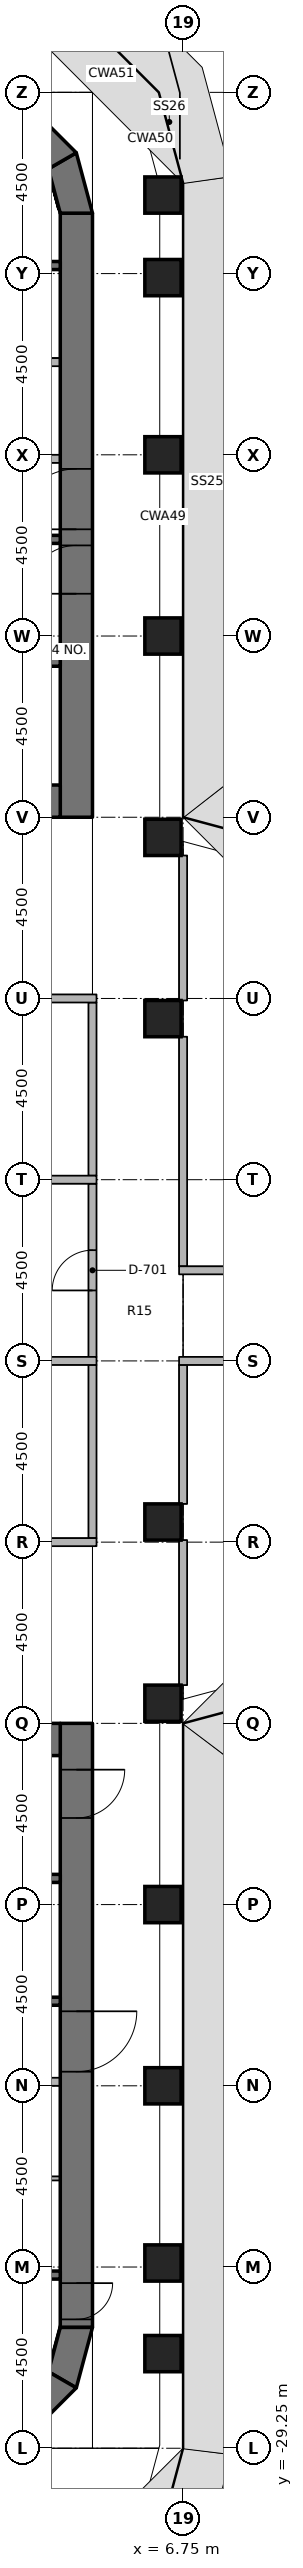
"""IFC4 building model, lengths in metres.
Left out: names, types, materials, properties, quantities, classifications, styles, units other than length and angle.
Written with IfcOpenShell. Run it as: python <this file> out.ifc"""

import sys

from ifc_helpers import new_model, si_unit, direction, frame, frame_2d, origin, origin_2d, place, context, subcontext, project, spatial, polyline, rectangle, outline, extrude, element, fill, save


model = new_model("IFC4")
c1 = context("Model", 3, precision=1e-05, world=origin(), true_north=direction((0.0, 1.0)))
c2 = subcontext(c1, "Body", "Model", "MODEL_VIEW")
j1 = project(units=[si_unit("LENGTHUNIT", "METRE"), si_unit("PLANEANGLEUNIT", "RADIAN")], contexts=[c1])
p1 = place(None, origin())
s1 = spatial("IfcSite", under=j1, at=p1, CompositionType="ELEMENT")
p2 = place(p1, origin())
s2 = spatial("IfcBuilding", under=s1, at=p2, CompositionType="ELEMENT")
p3 = place(p2, frame((0.0, 0.0, 94.2)))
s3 = spatial("IfcBuildingStorey", under=s2, at=p3, CompositionType="ELEMENT", Elevation=94.2)
for number, where, z_axis, x_axis in (
    (1, (6.25, -26.9, 0.0), (0.0, 0.0, 1.0), (1.0, 0.0, 0.0)),
    (2, (6.25, -24.65, 0.0), (0.0, 0.0, 1.0), (1.0, 0.0, 0.0)),
    (3, (6.25, -20.25, 0.0), (0.0, 0.0, 1.0), (1.0, 0.0, 0.0)),
    (4, (6.25, -15.75, 0.0), (0.0, 0.0, 1.0), (1.0, 0.0, 0.0)),
    (5, (6.25, -10.75, 0.0), (0.0, 0.0, 1.0), (1.0, 0.0, 0.0)),
    (6, (6.25, -6.25, 0.0), (0.0, 0.0, 1.0), (1.0, 0.0, 0.0)),
    (7, (6.25, 6.25, 0.0), (0.0, 0.0, 1.0), (1.0, 0.0, 0.0)),
    (8, (6.25, 10.75, 0.0), (0.0, 0.0, 1.0), (1.0, 0.0, 0.0)),
    (9, (6.25, 15.75, 0.0), (0.0, 0.0, 1.0), (1.0, 0.0, 0.0)),
    (10, (6.25, 20.25, 0.0), (0.0, 0.0, 1.0), (1.0, 0.0, 0.0)),
    (11, (6.25, 24.65, 0.0), (0.0, 0.0, 1.0), (1.0, 0.0, 0.0)),
    (12, (6.25, 26.7, 0.0), (0.0, 0.0, 1.0), (1.0, 0.0, 0.0)),
):
    element("IfcColumn", number, at=place(p3, frame(where, z_axis=z_axis, x_axis=x_axis)), inside=s3, PredefinedType="COLUMN", context=c2, shape_type="SweptSolid", body=[
        extrude(rectangle(XDim=0.9, YDim=0.9, at=origin_2d()), origin(), (0.0, 0.0, 1.0), 3.65),
    ])
p4 = place(p3, frame((4.1, 11.25, 0.0), z_axis=(0.0, 0.0, 1.0), x_axis=(0.0, 1.0, 0.0)))
e13 = element("IfcWall", 13, at=p4, inside=s3, PredefinedType="SHEAR", context=c2, shape_type="SweptSolid", body=[
    extrude(rectangle(XDim=15.0, YDim=0.8, at=frame_2d((7.5, 0.0))), origin(), (0.0, 0.0, 1.0), 3.8),
])
p5 = place(p4, frame((7.15, 0.0, 0.0)))
e14 = element("IfcOpeningElement", 14, at=p5, cuts=e13, PredefinedType="OPENING", context=c2, shape_type="SweptSolid", body=[
    extrude(rectangle(XDim=1.5, YDim=2.3, at=frame_2d((0.75, 1.15))), frame((0.0, 0.41, 0.0), z_axis=(0.0, -1.0, 0.0), x_axis=(1.0, 0.0, 0.0)), (0.0, 0.0, 1.0), 0.82),
])
p6 = place(p4, frame((5.55, 0.0, 0.0)))
e15 = element("IfcOpeningElement", 15, at=p6, cuts=e13, PredefinedType="OPENING", context=c2, shape_type="SweptSolid", body=[
    extrude(rectangle(XDim=1.2, YDim=2.1, at=frame_2d((0.6, 1.05))), frame((0.0, 0.41, 0.0), z_axis=(0.0, -1.0, 0.0), x_axis=(1.0, 0.0, 0.0)), (0.0, 0.0, 1.0), 0.82),
])
p7 = place(p3, frame((-3.7, 11.65, 0.0), z_axis=(0.0, 0.0, 1.0), x_axis=(1.0, 0.0, 0.0)))
e16 = element("IfcWall", 16, at=p7, inside=s3, PredefinedType="SHEAR", context=c2, shape_type="SweptSolid", body=[
    extrude(rectangle(XDim=7.4, YDim=0.8, at=frame_2d((3.7, 0.0))), origin(), (0.0, 0.0, 1.0), 3.8),
])
p8 = place(p3, origin())
e17 = element("IfcWall", 17, at=p8, inside=s3, PredefinedType="SHEAR", context=c2, shape_type="SweptSolid", body=[
    extrude(outline(polyline([(4.5, 26.25), (4.098, 27.75), (3.405, 27.35), (3.7, 26.25), (4.5, 26.25)])), origin(), (0.0, 0.0, 1.0), 3.8),
])
p9 = place(p3, origin())
e18 = element("IfcWall", 18, at=p9, inside=s3, PredefinedType="SHEAR", context=c2, shape_type="SweptSolid", body=[
    extrude(outline(polyline([(4.098, 27.75), (3.0, 28.848), (2.6, 28.155), (3.405, 27.35), (4.098, 27.75)])), origin(), (0.0, 0.0, 1.0), 3.8),
])
p10 = place(p3, frame((4.1, -11.25, 0.0), z_axis=(0.0, 0.0, 1.0), x_axis=(0.0, -1.0, 0.0)))
e19 = element("IfcWall", 19, at=p10, inside=s3, PredefinedType="SHEAR", context=c2, shape_type="SweptSolid", body=[
    extrude(rectangle(XDim=15.0, YDim=0.8, at=frame_2d((7.5, 0.0))), origin(), (0.0, 0.0, 1.0), 3.8),
])
p11 = place(p10, frame((7.15, 0.0, 0.0)))
e20 = element("IfcOpeningElement", 20, at=p11, cuts=e19, PredefinedType="OPENING", context=c2, shape_type="SweptSolid", body=[
    extrude(rectangle(XDim=1.5, YDim=2.3, at=frame_2d((0.75, 1.15))), frame((0.0, 0.41, 0.0), z_axis=(0.0, -1.0, 0.0), x_axis=(1.0, 0.0, 0.0)), (0.0, 0.0, 1.0), 0.82),
])
p12 = place(p10, frame((13.9, 0.0, 0.0)))
e21 = element("IfcOpeningElement", 21, at=p12, cuts=e19, PredefinedType="OPENING", context=c2, shape_type="SweptSolid", body=[
    extrude(rectangle(XDim=0.9, YDim=2.1, at=frame_2d((0.45, 1.05))), frame((0.0, 0.41, 0.0), z_axis=(0.0, -1.0, 0.0), x_axis=(1.0, 0.0, 0.0)), (0.0, 0.0, 1.0), 0.82),
])
p13 = place(p10, frame((1.15, 0.0, 0.0)))
e22 = element("IfcOpeningElement", 22, at=p13, cuts=e19, PredefinedType="OPENING", context=c2, shape_type="SweptSolid", body=[
    extrude(rectangle(XDim=1.2, YDim=2.1, at=frame_2d((0.6, 1.05))), frame((0.0, 0.41, 0.0), z_axis=(0.0, -1.0, 0.0), x_axis=(1.0, 0.0, 0.0)), (0.0, 0.0, 1.0), 0.82),
])
p14 = place(p3, frame((-3.7, -11.65, 0.0), z_axis=(0.0, 0.0, 1.0), x_axis=(1.0, 0.0, 0.0)))
e23 = element("IfcWall", 23, at=p14, inside=s3, PredefinedType="SHEAR", context=c2, shape_type="SweptSolid", body=[
    extrude(rectangle(XDim=7.4, YDim=0.8, at=frame_2d((3.7, 0.0))), origin(), (0.0, 0.0, 1.0), 3.8),
])
p15 = place(p3, origin())
e24 = element("IfcWall", 24, at=p15, inside=s3, PredefinedType="SHEAR", context=c2, shape_type="SweptSolid", body=[
    extrude(outline(polyline([(4.5, -26.25), (4.098, -27.75), (3.405, -27.35), (3.7, -26.25), (4.5, -26.25)])), origin(), (0.0, 0.0, 1.0), 3.8),
])
p16 = place(p3, origin())
e25 = element("IfcWall", 25, at=p16, inside=s3, PredefinedType="SHEAR", context=c2, shape_type="SweptSolid", body=[
    extrude(outline(polyline([(4.098, -27.75), (3.0, -28.848), (2.6, -28.155), (3.405, -27.35), (4.098, -27.75)])), origin(), (0.0, 0.0, 1.0), 3.8),
])
for number, where, z_axis, x_axis in (
    (26, (-3.7, 24.95, 0.0), (0.0, 0.0, 1.0), (1.0, 0.0, 0.0)),
    (27, (-3.7, 18.15, 0.0), (0.0, 0.0, 1.0), (1.0, 0.0, 0.0)),
    (28, (-3.7, 15.1, 0.0), (0.0, 0.0, 1.0), (1.0, 0.0, 0.0)),
):
    element("IfcWall", number, at=place(p3, frame(where, z_axis=z_axis, x_axis=x_axis)), inside=s3, PredefinedType="SHEAR", context=c2, shape_type="SweptSolid", body=[
        extrude(rectangle(XDim=7.4, YDim=0.2, at=frame_2d((3.7, 0.0))), origin(), (0.0, 0.0, 1.0), 3.65),
    ])
p17 = place(p3, frame((0.9, 20.15, 0.0), z_axis=(0.0, 0.0, 1.0), x_axis=(1.0, 0.0, 0.0)))
e29 = element("IfcWall", 29, at=p17, inside=s3, PredefinedType="PARTITIONING", context=c2, shape_type="SweptSolid", body=[
    extrude(rectangle(XDim=2.8, YDim=0.2, at=frame_2d((1.4, 0.0))), origin(), (0.0, 0.0, 1.0), 3.65),
])
p18 = place(p3, frame((1.1, 22.55, 0.0), z_axis=(0.0, 0.0, 1.0), x_axis=(1.0, 0.0, 0.0)))
e30 = element("IfcWall", 30, at=p18, inside=s3, PredefinedType="PARTITIONING", context=c2, shape_type="SweptSolid", body=[
    extrude(rectangle(XDim=2.6, YDim=0.2, at=frame_2d((1.3, 0.0))), origin(), (0.0, 0.0, 1.0), 3.65),
])
for number, where, z_axis, x_axis in (
    (31, (3.7, -24.95, 0.0), (0.0, 0.0, 1.0), (-1.0, 0.0, 0.0)),
    (32, (3.7, -18.15, 0.0), (0.0, 0.0, 1.0), (-1.0, 0.0, 0.0)),
    (33, (3.7, -15.1, 0.0), (0.0, 0.0, 1.0), (-1.0, 0.0, 0.0)),
):
    element("IfcWall", number, at=place(p3, frame(where, z_axis=z_axis, x_axis=x_axis)), inside=s3, PredefinedType="SHEAR", context=c2, shape_type="SweptSolid", body=[
        extrude(rectangle(XDim=7.4, YDim=0.2, at=frame_2d((3.7, 0.0))), origin(), (0.0, 0.0, 1.0), 3.65),
    ])
p19 = place(p3, frame((3.7, -20.15, 0.0), z_axis=(0.0, 0.0, 1.0), x_axis=(-1.0, 0.0, 0.0)))
e34 = element("IfcWall", 34, at=p19, inside=s3, PredefinedType="PARTITIONING", context=c2, shape_type="SweptSolid", body=[
    extrude(rectangle(XDim=2.8, YDim=0.2, at=frame_2d((1.4, 0.0))), origin(), (0.0, 0.0, 1.0), 3.65),
])
p20 = place(p3, frame((3.7, -22.55, 0.0), z_axis=(0.0, 0.0, 1.0), x_axis=(-1.0, 0.0, 0.0)))
e35 = element("IfcWall", 35, at=p20, inside=s3, PredefinedType="PARTITIONING", context=c2, shape_type="SweptSolid", body=[
    extrude(rectangle(XDim=2.6, YDim=0.1, at=frame_2d((1.3, 0.0))), origin(), (0.0, 0.0, 1.0), 3.65),
])
p21 = place(p3, frame((4.5, 2.35, 0.0), z_axis=(0.0, 0.0, 1.0), x_axis=(0.0, 1.0, 0.0)))
e36 = element("IfcWall", 36, at=p21, inside=s3, PredefinedType="PARTITIONING", context=c2, shape_type="SweptSolid", body=[
    extrude(rectangle(XDim=4.3, YDim=0.2, at=frame_2d((2.15, 0.0))), origin(), (0.0, 0.0, 1.0), 2.738),
])
p22 = place(p3, frame((4.5, -2.15, 0.0), z_axis=(0.0, 0.0, 1.0), x_axis=(0.0, 1.0, 0.0)))
e37 = element("IfcWall", 37, at=p22, inside=s3, PredefinedType="PARTITIONING", context=c2, shape_type="SweptSolid", body=[
    extrude(rectangle(XDim=4.3, YDim=0.2, at=frame_2d((2.15, 0.0))), origin(), (0.0, 0.0, 1.0), 2.738),
])
p23 = place(p22, frame((1.65, 0.0, 0.0)))
e38 = element("IfcOpeningElement", 38, at=p23, cuts=e37, PredefinedType="OPENING", context=c2, shape_type="SweptSolid", body=[
    extrude(rectangle(XDim=1.0, YDim=2.1, at=frame_2d((0.5, 1.05))), frame((0.0, 0.11, 0.0), z_axis=(0.0, -1.0, 0.0), x_axis=(1.0, 0.0, 0.0)), (0.0, 0.0, 1.0), 0.22),
])
p24 = place(p3, frame((4.5, -6.65, 0.0), z_axis=(0.0, 0.0, 1.0), x_axis=(0.0, 1.0, 0.0)))
e39 = element("IfcWall", 39, at=p24, inside=s3, PredefinedType="PARTITIONING", context=c2, shape_type="SweptSolid", body=[
    extrude(rectangle(XDim=4.3, YDim=0.2, at=frame_2d((2.15, 0.0))), origin(), (0.0, 0.0, 1.0), 2.738),
])
p25 = place(p3, frame((6.75, 0.1, 0.0), z_axis=(0.0, 0.0, 1.0), x_axis=(0.0, 1.0, 0.0)))
e40 = element("IfcWall", 40, at=p25, inside=s3, PredefinedType="PARTITIONING", context=c2, shape_type="SweptSolid", body=[
    extrude(rectangle(XDim=5.7, YDim=0.2, at=frame_2d((2.85, 0.0))), origin(), (0.0, 0.0, 1.0), 2.738),
])
for number, where, z_axis, x_axis in (
    (41, (6.75, 6.7, 0.0), (0.0, 0.0, 1.0), (0.0, 1.0, 0.0)),
    (42, (6.75, -10.3, 0.0), (0.0, 0.0, 1.0), (0.0, 1.0, 0.0)),
):
    element("IfcWall", number, at=place(p3, frame(where, z_axis=z_axis, x_axis=x_axis)), inside=s3, PredefinedType="PARTITIONING", context=c2, shape_type="SweptSolid", body=[
        extrude(rectangle(XDim=3.6, YDim=0.2, at=frame_2d((1.8, 0.0))), origin(), (0.0, 0.0, 1.0), 2.738),
    ])
p26 = place(p3, frame((6.75, -5.8, 0.0), z_axis=(0.0, 0.0, 1.0), x_axis=(0.0, 1.0, 0.0)))
e43 = element("IfcWall", 43, at=p26, inside=s3, PredefinedType="PARTITIONING", context=c2, shape_type="SweptSolid", body=[
    extrude(rectangle(XDim=3.45, YDim=0.2, at=frame_2d((1.725, 0.0))), origin(), (0.0, 0.0, 1.0), 2.738),
])
p27 = place(p3, frame((4.6, 6.75, 0.0), z_axis=(0.0, 0.0, 1.0), x_axis=(-1.0, 0.0, 0.0)))
e44 = element("IfcWall", 44, at=p27, inside=s3, PredefinedType="PARTITIONING", context=c2, shape_type="SweptSolid", body=[
    extrude(rectangle(XDim=9.2, YDim=0.2, at=frame_2d((4.6, 0.0))), origin(), (0.0, 0.0, 1.0), 2.738),
])
p28 = place(p27, frame((4.1, 0.0, 0.0)))
e45 = element("IfcOpeningElement", 45, at=p28, cuts=e44, PredefinedType="OPENING", context=c2, shape_type="SweptSolid", body=[
    extrude(rectangle(XDim=1.0, YDim=2.1, at=frame_2d((0.5, 1.05))), frame((0.0, 0.11, 0.0), z_axis=(0.0, -1.0, 0.0), x_axis=(1.0, 0.0, 0.0)), (0.0, 0.0, 1.0), 0.22),
])
p29 = place(p3, frame((-4.6, -6.75, 0.0), z_axis=(0.0, 0.0, 1.0), x_axis=(1.0, 0.0, 0.0)))
e46 = element("IfcWall", 46, at=p29, inside=s3, PredefinedType="PARTITIONING", context=c2, shape_type="SweptSolid", body=[
    extrude(rectangle(XDim=9.2, YDim=0.2, at=frame_2d((4.6, 0.0))), origin(), (0.0, 0.0, 1.0), 2.738),
])
p30 = place(p29, frame((4.1, 0.0, 0.0)))
e47 = element("IfcOpeningElement", 47, at=p30, cuts=e46, PredefinedType="OPENING", context=c2, shape_type="SweptSolid", body=[
    extrude(rectangle(XDim=1.0, YDim=2.1, at=frame_2d((0.5, 1.05))), frame((0.0, 0.11, 0.0), z_axis=(0.0, -1.0, 0.0), x_axis=(1.0, 0.0, 0.0)), (0.0, 0.0, 1.0), 0.22),
])
for number, where, z_axis, x_axis in (
    (48, (-4.6, 2.25, 0.0), (0.0, 0.0, 1.0), (1.0, 0.0, 0.0)),
    (49, (-4.6, -2.25, 0.0), (0.0, 0.0, 1.0), (1.0, 0.0, 0.0)),
):
    element("IfcWall", number, at=place(p3, frame(where, z_axis=z_axis, x_axis=x_axis)), inside=s3, PredefinedType="PARTITIONING", context=c2, shape_type="SweptSolid", body=[
        extrude(rectangle(XDim=9.2, YDim=0.2, at=frame_2d((4.6, 0.0))), origin(), (0.0, 0.0, 1.0), 2.738),
    ])
p31 = place(p3, frame((6.65, 0.0, 0.0), z_axis=(0.0, 0.0, 1.0), x_axis=(1.0, 0.0, 0.0)))
e50 = element("IfcWall", 50, at=p31, inside=s3, PredefinedType="PARTITIONING", context=c2, shape_type="SweptSolid", body=[
    extrude(rectangle(XDim=4.7, YDim=0.2, at=frame_2d((2.35, 0.0))), origin(), (0.0, 0.0, 1.0), 2.738),
])
p32 = place(p31, frame((1.85, 0.0, 0.0)))
e51 = element("IfcOpeningElement", 51, at=p32, cuts=e50, PredefinedType="OPENING", context=c2, shape_type="SweptSolid", body=[
    extrude(rectangle(XDim=1.0, YDim=2.1, at=frame_2d((0.5, 1.05))), frame((0.0, 0.11, 0.0), z_axis=(0.0, -1.0, 0.0), x_axis=(1.0, 0.0, 0.0)), (0.0, 0.0, 1.0), 0.22),
])
p33 = place(p3, frame((11.35, -2.25, 0.0), z_axis=(0.0, 0.0, 1.0), x_axis=(-1.0, 0.0, 0.0)))
e52 = element("IfcWall", 52, at=p33, inside=s3, PredefinedType="PARTITIONING", context=c2, shape_type="SweptSolid", body=[
    extrude(rectangle(XDim=4.7, YDim=0.2, at=frame_2d((2.35, 0.0))), origin(), (0.0, 0.0, 1.0), 2.738),
])
p34 = place(p33, frame((1.85, 0.0, 0.0)))
e53 = element("IfcOpeningElement", 53, at=p34, cuts=e52, PredefinedType="OPENING", context=c2, shape_type="SweptSolid", body=[
    extrude(rectangle(XDim=1.0, YDim=2.1, at=frame_2d((0.5, 1.05))), frame((0.0, 0.11, 0.0), z_axis=(0.0, -1.0, 0.0), x_axis=(1.0, 0.0, 0.0)), (0.0, 0.0, 1.0), 0.22),
])
p35 = place(p5, origin())
e54 = element("IfcDoor", 54, at=p35, inside=s3, OperationType="DOUBLE_DOOR_SINGLE_SWING", PredefinedType="DOOR", context=c2, shape_type="SweptSolid", body=[
    extrude(rectangle(XDim=1.5, YDim=2.3, at=frame_2d((0.75, 1.15))), frame((0.0, 0.025, 0.0), z_axis=(0.0, -1.0, 0.0), x_axis=(1.0, 0.0, 0.0)), (0.0, 0.0, 1.0), 0.05),
])
fill(e14, e54)
p36 = place(p6, origin())
e55 = element("IfcDoor", 55, at=p36, inside=s3, OperationType="SINGLE_SWING_LEFT", PredefinedType="DOOR", context=c2, shape_type="SweptSolid", body=[
    extrude(rectangle(XDim=1.2, YDim=2.1, at=frame_2d((0.6, 1.05))), frame((0.0, 0.025, 0.0), z_axis=(0.0, -1.0, 0.0), x_axis=(1.0, 0.0, 0.0)), (0.0, 0.0, 1.0), 0.05),
])
fill(e15, e55)
p37 = place(p11, origin())
e56 = element("IfcDoor", 56, at=p37, inside=s3, OperationType="DOUBLE_DOOR_SINGLE_SWING", PredefinedType="DOOR", context=c2, shape_type="SweptSolid", body=[
    extrude(rectangle(XDim=1.5, YDim=2.3, at=frame_2d((0.75, 1.15))), frame((0.0, 0.025, 0.0), z_axis=(0.0, -1.0, 0.0), x_axis=(1.0, 0.0, 0.0)), (0.0, 0.0, 1.0), 0.05),
])
fill(e20, e56)
p38 = place(p12, origin())
e57 = element("IfcDoor", 57, at=p38, inside=s3, OperationType="SINGLE_SWING_RIGHT", PredefinedType="DOOR", context=c2, shape_type="SweptSolid", body=[
    extrude(rectangle(XDim=0.9, YDim=2.1, at=frame_2d((0.45, 1.05))), frame((0.0, 0.025, 0.0), z_axis=(0.0, -1.0, 0.0), x_axis=(1.0, 0.0, 0.0)), (0.0, 0.0, 1.0), 0.05),
])
fill(e21, e57)
p39 = place(p13, origin())
e58 = element("IfcDoor", 58, at=p39, inside=s3, OperationType="SINGLE_SWING_LEFT", PredefinedType="DOOR", context=c2, shape_type="SweptSolid", body=[
    extrude(rectangle(XDim=1.2, YDim=2.1, at=frame_2d((0.6, 1.05))), frame((0.0, 0.025, 0.0), z_axis=(0.0, -1.0, 0.0), x_axis=(1.0, 0.0, 0.0)), (0.0, 0.0, 1.0), 0.05),
])
fill(e22, e58)
p40 = place(p23, origin())
e59 = element("IfcDoor", 59, at=p40, inside=s3, OperationType="SINGLE_SWING_RIGHT", PredefinedType="DOOR", context=c2, shape_type="SweptSolid", body=[
    extrude(rectangle(XDim=1.0, YDim=2.1, at=frame_2d((0.5, 1.05))), frame((0.0, 0.025, 0.0), z_axis=(0.0, -1.0, 0.0), x_axis=(1.0, 0.0, 0.0)), (0.0, 0.0, 1.0), 0.05),
])
fill(e38, e59)
save(model, sys.argv[1])
